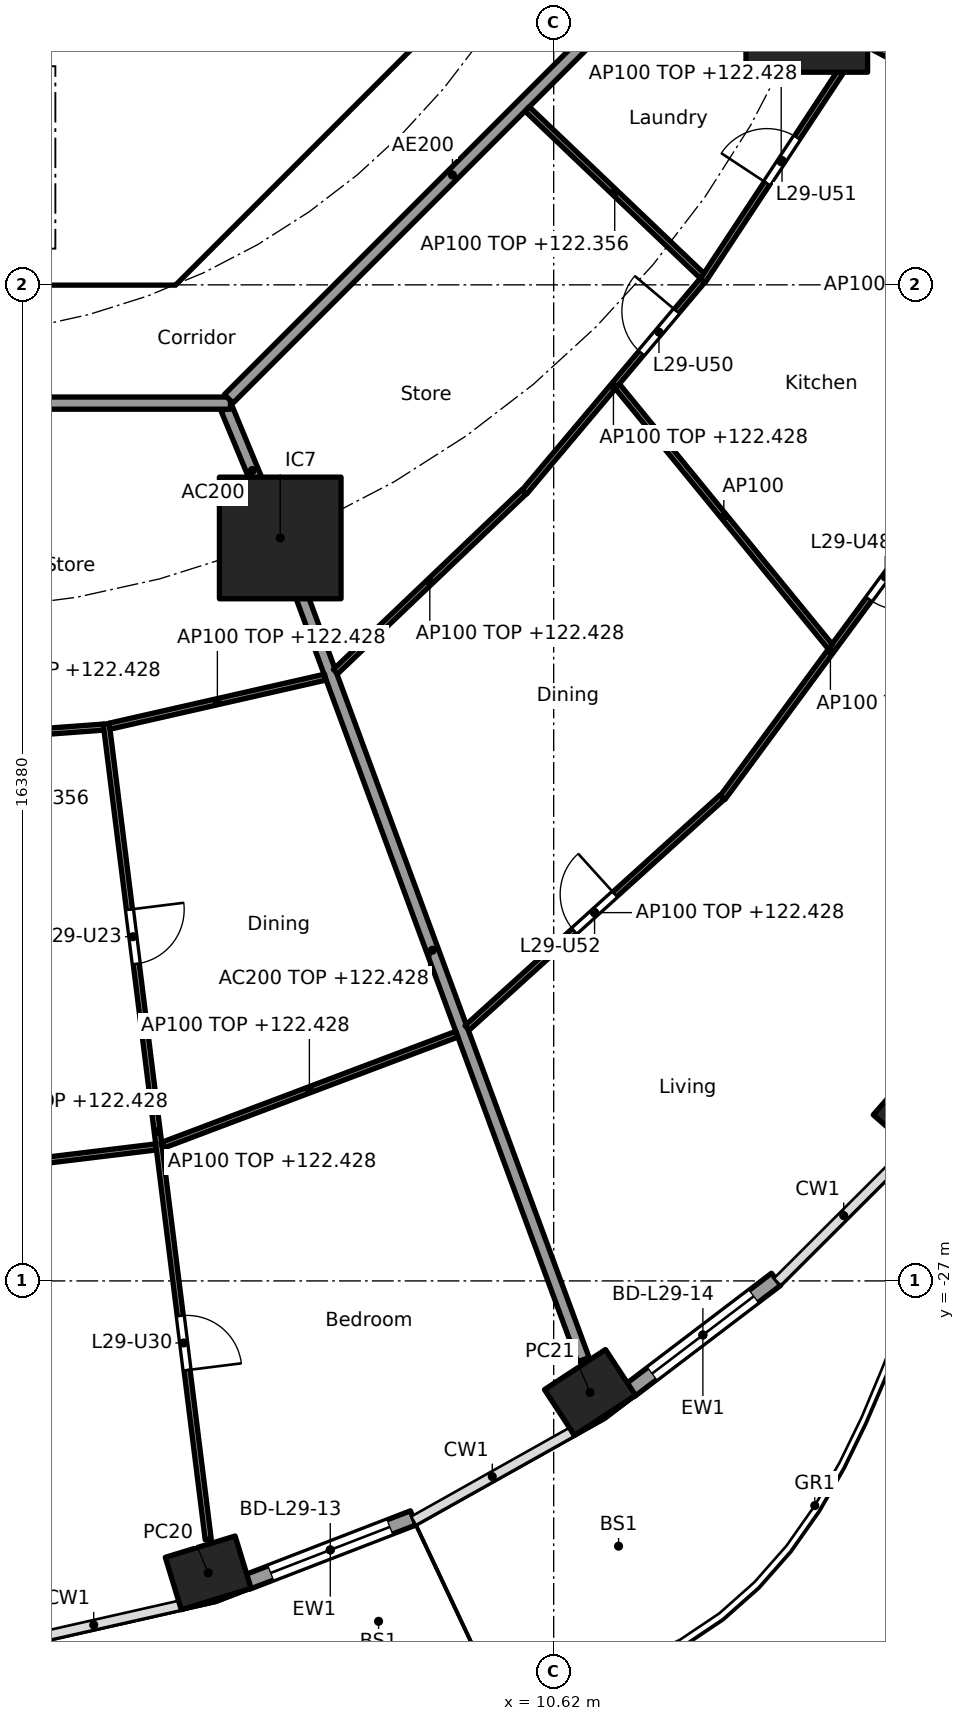
"""IFC4 building model, lengths in metres.
Left out: names, types, materials, properties, quantities, classifications, styles, units other than length and angle.
Written with IfcOpenShell. Run it as: python <this file> out.ifc"""

import sys

from ifc_helpers import new_model, si_unit, direction, frame, frame_2d, origin, origin_2d, place, context, subcontext, project, spatial, polyline, rectangle, hollow_rectangle, outline, extrude, element, fill, save


model = new_model("IFC4")
c1 = context("Model", 3, precision=1e-05, world=origin(), true_north=direction((0.0, 1.0)))
c2 = subcontext(c1, "Body", "Model", "MODEL_VIEW")
j1 = project(units=[si_unit("LENGTHUNIT", "METRE"), si_unit("PLANEANGLEUNIT", "RADIAN")], contexts=[c1])
p1 = place(None, origin())
s1 = spatial("IfcSite", under=j1, at=p1, CompositionType="ELEMENT")
p2 = place(p1, origin())
s2 = spatial("IfcBuilding", under=s1, at=p2, CompositionType="ELEMENT")
p3 = place(p2, frame((0.0, 0.0, 119.6)))
s3 = spatial("IfcBuildingStorey", under=s2, at=p3, CompositionType="ELEMENT", Elevation=119.6)
for number, where, z_axis, x_axis in (
    (1, (4.938, -31.801, -0.26), (0.0, 0.0, 1.0), (0.957, 0.292, 0.0)),
    (2, (11.218, -28.834, -0.26), (0.0, 0.0, 1.0), (0.836, 0.549, 0.0)),
    (3, (16.61, -24.115, -0.26), (0.0, 0.0, 1.0), (0.66, 0.751, 0.0)),
):
    element("IfcColumn", number, at=place(p3, frame(where, z_axis=z_axis, x_axis=x_axis)), inside=s3, PredefinedType="COLUMN", context=c2, shape_type="SweptSolid", body=[
        extrude(hollow_rectangle(XDim=1.2, YDim=0.9, WallThickness=0.04, at=origin_2d()), origin(), (0.0, 0.0, 1.0), 3.96),
    ])
for number, where, z_axis, x_axis in (
    (4, (6.123, -14.782, 0.0), (0.0, 0.0, 1.0), (1.0, 0.0, 0.0)),
    (5, (14.782, -6.123, 0.0), (0.0, 0.0, 1.0), (1.0, 0.0, 0.0)),
):
    element("IfcColumn", number, at=place(p3, frame(where, z_axis=z_axis, x_axis=x_axis)), inside=s3, PredefinedType="COLUMN", context=c2, shape_type="SweptSolid", body=[
        extrude(rectangle(XDim=2.0, YDim=2.0, at=origin_2d()), origin(), (0.0, 0.0, 1.0), 3.7),
    ])
p4 = place(p3, frame((8.31, -30.898, 0.0), z_axis=(0.0, 0.0, 1.0), x_axis=(-0.932845344347, -0.360277064952, 0.0)))
e6 = element("IfcWall", 6, at=p4, inside=s3, PredefinedType="SOLIDWALL", context=c2, shape_type="SweptSolid", body=[
    extrude(rectangle(XDim=2.923, YDim=0.25, at=frame_2d((1.462, 0.0))), origin(), (0.0, 0.0, 1.0), 3.44),
])
p5 = place(p4, frame((0.412, 0.0, 0.0)))
e7 = element("IfcOpeningElement", 7, at=p5, cuts=e6, PredefinedType="OPENING", context=c2, shape_type="SweptSolid", body=[
    extrude(rectangle(XDim=2.1, YDim=2.4, at=frame_2d((1.05, 1.2))), frame((0.0, 0.135, 0.0), z_axis=(0.0, -1.0, 0.0), x_axis=(1.0, 0.0, 0.0)), (0.0, 0.0, 1.0), 0.27),
])
p6 = place(p3, frame((14.278, -26.973, 0.0), z_axis=(0.0, 0.0, 1.0), x_axis=(-0.796022231079, -0.605267385233, 0.0)))
e8 = element("IfcWall", 8, at=p6, inside=s3, PredefinedType="SOLIDWALL", context=c2, shape_type="SweptSolid", body=[
    extrude(rectangle(XDim=3.026, YDim=0.25, at=frame_2d((1.513, 0.0))), origin(), (0.0, 0.0, 1.0), 3.44),
])
p7 = place(p6, frame((0.463, 0.0, 0.0)))
e9 = element("IfcOpeningElement", 9, at=p7, cuts=e8, PredefinedType="OPENING", context=c2, shape_type="SweptSolid", body=[
    extrude(rectangle(XDim=2.1, YDim=2.4, at=frame_2d((1.05, 1.2))), frame((0.0, 0.135, 0.0), z_axis=(0.0, -1.0, 0.0), x_axis=(1.0, 0.0, 0.0)), (0.0, 0.0, 1.0), 0.27),
])
p8 = place(p3, frame((4.613, -9.988, 0.0), z_axis=(0.0, 0.0, 1.0), x_axis=(0.707106781187, 0.707106781187, 0.0)))
e10 = element("IfcWall", 10, at=p8, inside=s3, PredefinedType="SHEAR", context=c2, shape_type="SweptSolid", body=[
    extrude(rectangle(XDim=7.602, YDim=0.6, at=frame_2d((3.801, 0.0))), origin(), (0.0, 0.0, 1.0), 3.44),
])
p9 = place(p8, frame((3.201, 0.0, 0.0)))
e11 = element("IfcOpeningElement", 11, at=p9, cuts=e10, PredefinedType="OPENING", context=c2, shape_type="SweptSolid", body=[
    extrude(rectangle(XDim=1.2, YDim=2.1, at=frame_2d((0.6, 1.05))), frame((0.0, 0.31, 0.0), z_axis=(0.0, -1.0, 0.0), x_axis=(1.0, 0.0, 0.0)), (0.0, 0.0, 1.0), 0.62),
])
p10 = place(p3, frame((4.0, -10.025, 0.0), z_axis=(0.0, 0.0, 1.0), x_axis=(0.0, 1.0, 0.0)))
e12 = element("IfcWall", 12, at=p10, inside=s3, PredefinedType="SOLIDWALL", context=c2, shape_type="SweptSolid", body=[
    extrude(rectangle(XDim=3.0, YDim=0.2, at=frame_2d((1.5, 0.0))), origin(), (0.0, 0.0, 1.0), 3.44),
])
p11 = place(p10, frame((0.975, 0.0, 0.0)))
e13 = element("IfcOpeningElement", 13, at=p11, cuts=e12, PredefinedType="OPENING", context=c2, shape_type="SweptSolid", body=[
    extrude(rectangle(XDim=1.1, YDim=2.1, at=frame_2d((0.55, 1.05))), frame((0.0, 0.11, 0.0), z_axis=(0.0, -1.0, 0.0), x_axis=(1.0, 0.0, 0.0)), (0.0, 0.0, 1.0), 0.22),
])
p12 = place(p3, origin())
e14 = element("IfcWall", 14, at=p12, inside=s3, PredefinedType="SHEAR", context=c2, shape_type="SweptSolid", body=[
    extrude(outline(polyline([(-4.152, -10.025), (4.152, -10.025), (4.401, -9.776), (4.825, -10.2), (4.401, -10.625), (-4.401, -10.625), (-4.825, -10.2), (-4.401, -9.776), (-4.152, -10.025)])), origin(), (0.0, 0.0, 1.0), 3.44),
])
p13 = place(p3, origin())
e15 = element("IfcWall", 15, at=p13, inside=s3, PredefinedType="SOLIDWALL", context=c2, shape_type="SweptSolid", body=[
    extrude(outline(polyline([(4.1, -7.025), (-4.1, -7.025), (-4.1, -6.5), (4.1, -6.5), (4.1, -7.025)])), origin(), (0.0, 0.0, 1.0), 3.44),
])
p14 = place(p3, frame((5.243, -12.657, 0.0), z_axis=(0.0, 0.0, 1.0), x_axis=(0.38273085373, -0.923859888513, 0.0)))
e16 = element("IfcWall", 16, at=p14, inside=s3, PredefinedType="PARTITIONING", context=c2, shape_type="SweptSolid", body=[
    extrude(rectangle(XDim=2.199, YDim=0.2, at=frame_2d((1.1, 0.0))), origin(), (0.0, 0.0, 1.0), 3.44),
])
p15 = place(p3, frame((6.14, -14.829, 0.0), z_axis=(0.0, 0.0, 1.0), x_axis=(0.346169582481, -0.938171956608, 0.0)))
e17 = element("IfcWall", 17, at=p15, inside=s3, PredefinedType="PARTITIONING", context=c2, shape_type="SweptSolid", body=[
    extrude(rectangle(XDim=14.354, YDim=0.2, at=frame_2d((7.177, 0.0))), origin(), (0.0, 0.0, 1.0), 2.828),
])
p16 = place(p3, frame((-5.104, -12.565, 0.0), z_axis=(0.0, 0.0, 1.0), x_axis=(1.0, 0.0, 0.0)))
e18 = element("IfcWall", 18, at=p16, inside=s3, PredefinedType="PARTITIONING", context=c2, shape_type="SweptSolid", body=[
    extrude(rectangle(XDim=10.409, YDim=0.2, at=frame_2d((5.205, 0.0))), origin(), (0.0, 0.0, 1.0), 3.44),
])
p17 = place(p3, frame((5.275, -12.494, 0.0), z_axis=(0.0, 0.0, 1.0), x_axis=(0.707106781187, 0.707106781187, 0.0)))
e19 = element("IfcWall", 19, at=p17, inside=s3, PredefinedType="PARTITIONING", context=c2, shape_type="SweptSolid", body=[
    extrude(rectangle(XDim=10.409, YDim=0.2, at=frame_2d((5.205, 0.0))), origin(), (0.0, 0.0, 1.0), 3.44),
])
p18 = place(p3, frame((-0.436, -18.163, 0.0), z_axis=(0.0, 0.0, 1.0), x_axis=(0.997271025958, 0.073827506966, 0.0)))
e20 = element("IfcWall", 20, at=p18, inside=s3, PredefinedType="PARTITIONING", context=c2, shape_type="SweptSolid", body=[
    extrude(rectangle(XDim=3.664, YDim=0.1, at=frame_2d((1.832, 0.0))), origin(), (0.0, 0.0, 1.0), 2.828),
])
p19 = place(p3, frame((-1.066, -25.422, 0.0), z_axis=(0.0, 0.0, 1.0), x_axis=(0.992692993044, 0.120667400577, 0.0)))
e21 = element("IfcWall", 21, at=p19, inside=s3, PredefinedType="PARTITIONING", context=c2, shape_type="SweptSolid", body=[
    extrude(rectangle(XDim=5.186, YDim=0.1, at=frame_2d((2.593, 0.0))), origin(), (0.0, 0.0, 1.0), 2.828),
])
p20 = place(p3, frame((3.262, -17.839, 0.0), z_axis=(0.0, 0.0, 1.0), x_axis=(0.124074750982, -0.992272873845, 0.0)))
e22 = element("IfcWall", 22, at=p20, inside=s3, PredefinedType="PARTITIONING", context=c2, shape_type="SweptSolid", body=[
    extrude(rectangle(XDim=13.516, YDim=0.1, at=frame_2d((6.758, 0.0))), origin(), (0.0, 0.0, 1.0), 2.828),
])
p21 = place(p20, frame((3.078, 0.0, 0.0)))
e23 = element("IfcOpeningElement", 23, at=p21, cuts=e22, PredefinedType="OPENING", context=c2, shape_type="SweptSolid", body=[
    extrude(rectangle(XDim=0.9, YDim=2.1, at=frame_2d((0.45, 1.05))), frame((0.0, 0.06, 0.0), z_axis=(0.0, -1.0, 0.0), x_axis=(1.0, 0.0, 0.0)), (0.0, 0.0, 1.0), 0.12),
])
p22 = place(p20, frame((9.811, 0.0, 0.0)))
e24 = element("IfcOpeningElement", 24, at=p22, cuts=e22, PredefinedType="OPENING", context=c2, shape_type="SweptSolid", body=[
    extrude(rectangle(XDim=0.9, YDim=2.1, at=frame_2d((0.45, 1.05))), frame((0.0, 0.06, 0.0), z_axis=(0.0, -1.0, 0.0), x_axis=(1.0, 0.0, 0.0)), (0.0, 0.0, 1.0), 0.12),
])
p23 = place(p3, frame((3.317, -17.878, 0.0), z_axis=(0.0, 0.0, 1.0), x_axis=(0.975095905288, 0.221783623135, 0.0)))
e25 = element("IfcWall", 25, at=p23, inside=s3, PredefinedType="PARTITIONING", context=c2, shape_type="SweptSolid", body=[
    extrude(rectangle(XDim=3.636, YDim=0.1, at=frame_2d((1.818, 0.0))), origin(), (0.0, 0.0, 1.0), 2.828),
])
p24 = place(p3, frame((4.178, -24.773, 0.0), z_axis=(0.0, 0.0, 1.0), x_axis=(0.935583811437, 0.353104703702, 0.0)))
e26 = element("IfcWall", 26, at=p24, inside=s3, PredefinedType="PARTITIONING", context=c2, shape_type="SweptSolid", body=[
    extrude(rectangle(XDim=5.184, YDim=0.1, at=frame_2d((2.592, 0.0))), origin(), (0.0, 0.0, 1.0), 2.828),
])
p25 = place(p3, frame((7.032, -16.98, 0.0), z_axis=(0.0, 0.0, 1.0), x_axis=(0.723709759148, 0.690104473622, 0.0)))
e27 = element("IfcWall", 27, at=p25, inside=s3, PredefinedType="PARTITIONING", context=c2, shape_type="SweptSolid", body=[
    extrude(rectangle(XDim=4.286, YDim=0.1, at=frame_2d((2.143, 0.0))), origin(), (0.0, 0.0, 1.0), 2.828),
])
p26 = place(p3, frame((9.195, -22.84, 0.0), z_axis=(0.0, 0.0, 1.0), x_axis=(0.741675855479, 0.670758470241, 0.0)))
e28 = element("IfcWall", 28, at=p26, inside=s3, PredefinedType="PARTITIONING", context=c2, shape_type="SweptSolid", body=[
    extrude(rectangle(XDim=5.656, YDim=0.1, at=frame_2d((2.828, 0.0))), origin(), (0.0, 0.0, 1.0), 2.828),
])
p27 = place(p26, frame((2.378, 0.0, 0.0)))
e29 = element("IfcOpeningElement", 29, at=p27, cuts=e28, PredefinedType="OPENING", context=c2, shape_type="SweptSolid", body=[
    extrude(rectangle(XDim=0.9, YDim=2.1, at=frame_2d((0.45, 1.05))), frame((0.0, 0.06, 0.0), z_axis=(0.0, -1.0, 0.0), x_axis=(1.0, 0.0, 0.0)), (0.0, 0.0, 1.0), 0.12),
])
p28 = place(p3, frame((10.138, -14.026, 0.0), z_axis=(0.0, 0.0, 1.0), x_axis=(0.644051444483, 0.764982180746, 0.0)))
e30 = element("IfcWall", 30, at=p28, inside=s3, PredefinedType="PARTITIONING", context=c2, shape_type="SweptSolid", body=[
    extrude(rectangle(XDim=4.548, YDim=0.1, at=frame_2d((2.274, 0.0))), origin(), (0.0, 0.0, 1.0), 2.828),
])
p29 = place(p28, frame((2.986, 0.0, 0.0)))
e31 = element("IfcOpeningElement", 31, at=p29, cuts=e30, PredefinedType="OPENING", context=c2, shape_type="SweptSolid", body=[
    extrude(rectangle(XDim=0.9, YDim=2.1, at=frame_2d((0.45, 1.05))), frame((0.0, 0.06, 0.0), z_axis=(0.0, -1.0, 0.0), x_axis=(1.0, 0.0, 0.0)), (0.0, 0.0, 1.0), 0.12),
])
p30 = place(p3, frame((13.397, -19.053, 0.0), z_axis=(0.0, 0.0, 1.0), x_axis=(0.593522299069, 0.804817544856, 0.0)))
e32 = element("IfcWall", 32, at=p30, inside=s3, PredefinedType="PARTITIONING", context=c2, shape_type="SweptSolid", body=[
    extrude(rectangle(XDim=5.976, YDim=0.1, at=frame_2d((2.988, 0.0))), origin(), (0.0, 0.0, 1.0), 2.828),
])
p31 = place(p30, frame((4.057, 0.0, 0.0)))
e33 = element("IfcOpeningElement", 33, at=p31, cuts=e32, PredefinedType="OPENING", context=c2, shape_type="SweptSolid", body=[
    extrude(rectangle(XDim=0.9, YDim=2.1, at=frame_2d((0.45, 1.05))), frame((0.0, 0.06, 0.0), z_axis=(0.0, -1.0, 0.0), x_axis=(1.0, 0.0, 0.0)), (0.0, 0.0, 1.0), 0.12),
])
p32 = place(p3, frame((11.667, -12.287, 0.0), z_axis=(0.0, 0.0, 1.0), x_axis=(0.633038312428, -0.774120465431, 0.0)))
e34 = element("IfcWall", 34, at=p32, inside=s3, PredefinedType="PARTITIONING", context=c2, shape_type="SweptSolid", body=[
    extrude(rectangle(XDim=5.532, YDim=0.1, at=frame_2d((2.766, 0.0))), origin(), (0.0, 0.0, 1.0), 3.44),
])
p33 = place(p3, frame((10.184, -7.727, 0.0), z_axis=(0.0, 0.0, 1.0), x_axis=(0.723654892782, -0.690162007179, 0.0)))
e35 = element("IfcWall", 35, at=p33, inside=s3, PredefinedType="PARTITIONING", context=c2, shape_type="SweptSolid", body=[
    extrude(rectangle(XDim=3.98, YDim=0.1, at=frame_2d((1.99, 0.0))), origin(), (0.0, 0.0, 1.0), 2.756),
])
p34 = place(p3, frame((13.072, -10.55, 0.0), z_axis=(0.0, 0.0, 1.0), x_axis=(0.550614843759, 0.834759422727, 0.0)))
e36 = element("IfcWall", 36, at=p34, inside=s3, PredefinedType="PARTITIONING", context=c2, shape_type="SweptSolid", body=[
    extrude(rectangle(XDim=4.683, YDim=0.1, at=frame_2d((2.341, 0.0))), origin(), (0.0, 0.0, 1.0), 2.828),
])
p35 = place(p34, frame((1.917, 0.0, 0.0)))
e37 = element("IfcOpeningElement", 37, at=p35, cuts=e36, PredefinedType="OPENING", context=c2, shape_type="SweptSolid", body=[
    extrude(rectangle(XDim=0.9, YDim=2.1, at=frame_2d((0.45, 1.05))), frame((0.0, 0.06, 0.0), z_axis=(0.0, -1.0, 0.0), x_axis=(1.0, 0.0, 0.0)), (0.0, 0.0, 1.0), 0.12),
])
p36 = place(p3, frame((14.826, -6.146, 0.0), z_axis=(0.0, 0.0, 1.0), x_axis=(0.883012998471, -0.469348532044, 0.0)))
e38 = element("IfcWall", 38, at=p36, inside=s3, PredefinedType="PARTITIONING", context=c2, shape_type="SweptSolid", body=[
    extrude(rectangle(XDim=9.172, YDim=0.1, at=frame_2d((4.586, 0.0))), origin(), (0.0, 0.0, 1.0), 2.828),
])
p37 = place(p36, frame((2.728, 0.0, 0.0)))
e39 = element("IfcOpeningElement", 39, at=p37, cuts=e38, PredefinedType="OPENING", context=c2, shape_type="SweptSolid", body=[
    extrude(rectangle(XDim=0.9, YDim=2.1, at=frame_2d((0.45, 1.05))), frame((0.0, 0.06, 0.0), z_axis=(0.0, -1.0, 0.0), x_axis=(1.0, 0.0, 0.0)), (0.0, 0.0, 1.0), 0.12),
])
p38 = place(p5, origin())
e40 = element("IfcDoor", 40, at=p38, inside=s3, OperationType="SLIDING_TO_LEFT", PredefinedType="DOOR", context=c2, shape_type="SweptSolid", body=[
    extrude(rectangle(XDim=2.1, YDim=2.4, at=frame_2d((1.05, 1.2))), frame((0.0, 0.025, 0.0), z_axis=(0.0, -1.0, 0.0), x_axis=(1.0, 0.0, 0.0)), (0.0, 0.0, 1.0), 0.05),
])
fill(e7, e40)
p39 = place(p7, origin())
e41 = element("IfcDoor", 41, at=p39, inside=s3, OperationType="SLIDING_TO_LEFT", PredefinedType="DOOR", context=c2, shape_type="SweptSolid", body=[
    extrude(rectangle(XDim=2.1, YDim=2.4, at=frame_2d((1.05, 1.2))), frame((0.0, 0.025, 0.0), z_axis=(0.0, -1.0, 0.0), x_axis=(1.0, 0.0, 0.0)), (0.0, 0.0, 1.0), 0.05),
])
fill(e9, e41)
p40 = place(p11, origin())
e42 = element("IfcDoor", 42, at=p40, inside=s3, OperationType="SINGLE_SWING_LEFT", PredefinedType="DOOR", context=c2, shape_type="SweptSolid", body=[
    extrude(rectangle(XDim=1.1, YDim=2.1, at=frame_2d((0.55, 1.05))), frame((0.0, 0.025, 0.0), z_axis=(0.0, -1.0, 0.0), x_axis=(1.0, 0.0, 0.0)), (0.0, 0.0, 1.0), 0.05),
])
fill(e13, e42)
p41 = place(p9, origin())
e43 = element("IfcDoor", 43, at=p41, inside=s3, OperationType="SINGLE_SWING_RIGHT", PredefinedType="DOOR", context=c2, shape_type="SweptSolid", body=[
    extrude(rectangle(XDim=1.2, YDim=2.1, at=frame_2d((0.6, 1.05))), frame((0.0, 0.025, 0.0), z_axis=(0.0, -1.0, 0.0), x_axis=(1.0, 0.0, 0.0)), (0.0, 0.0, 1.0), 0.05),
])
fill(e11, e43)
p42 = place(p21, origin())
e44 = element("IfcDoor", 44, at=p42, inside=s3, OperationType="SINGLE_SWING_LEFT", PredefinedType="DOOR", context=c2, shape_type="SweptSolid", body=[
    extrude(rectangle(XDim=0.9, YDim=2.1, at=frame_2d((0.45, 1.05))), frame((0.0, 0.025, 0.0), z_axis=(0.0, -1.0, 0.0), x_axis=(1.0, 0.0, 0.0)), (0.0, 0.0, 1.0), 0.05),
])
fill(e23, e44)
p43 = place(p22, origin())
e45 = element("IfcDoor", 45, at=p43, inside=s3, OperationType="SINGLE_SWING_RIGHT", PredefinedType="DOOR", context=c2, shape_type="SweptSolid", body=[
    extrude(rectangle(XDim=0.9, YDim=2.1, at=frame_2d((0.45, 1.05))), frame((0.0, 0.025, 0.0), z_axis=(0.0, -1.0, 0.0), x_axis=(1.0, 0.0, 0.0)), (0.0, 0.0, 1.0), 0.05),
])
fill(e24, e45)
p44 = place(p31, frame((0.9, 0.0, 0.0), x_axis=(-1.0, 0.0, 0.0)))
e46 = element("IfcDoor", 46, at=p44, inside=s3, OperationType="SINGLE_SWING_LEFT", PredefinedType="DOOR", context=c2, shape_type="SweptSolid", body=[
    extrude(rectangle(XDim=0.9, YDim=2.1, at=frame_2d((0.45, 1.05))), frame((0.0, 0.025, 0.0), z_axis=(0.0, -1.0, 0.0), x_axis=(1.0, 0.0, 0.0)), (0.0, 0.0, 1.0), 0.05),
])
fill(e33, e46)
p45 = place(p29, origin())
e47 = element("IfcDoor", 47, at=p45, inside=s3, OperationType="SINGLE_SWING_RIGHT", PredefinedType="DOOR", context=c2, shape_type="SweptSolid", body=[
    extrude(rectangle(XDim=0.9, YDim=2.1, at=frame_2d((0.45, 1.05))), frame((0.0, 0.025, 0.0), z_axis=(0.0, -1.0, 0.0), x_axis=(1.0, 0.0, 0.0)), (0.0, 0.0, 1.0), 0.05),
])
fill(e31, e47)
p46 = place(p35, origin())
e48 = element("IfcDoor", 48, at=p46, inside=s3, OperationType="SINGLE_SWING_LEFT", PredefinedType="DOOR", context=c2, shape_type="SweptSolid", body=[
    extrude(rectangle(XDim=0.9, YDim=2.1, at=frame_2d((0.45, 1.05))), frame((0.0, 0.025, 0.0), z_axis=(0.0, -1.0, 0.0), x_axis=(1.0, 0.0, 0.0)), (0.0, 0.0, 1.0), 0.05),
])
fill(e37, e48)
p47 = place(p27, origin())
e49 = element("IfcDoor", 49, at=p47, inside=s3, OperationType="SINGLE_SWING_RIGHT", PredefinedType="DOOR", context=c2, shape_type="SweptSolid", body=[
    extrude(rectangle(XDim=0.9, YDim=2.1, at=frame_2d((0.45, 1.05))), frame((0.0, 0.025, 0.0), z_axis=(0.0, -1.0, 0.0), x_axis=(1.0, 0.0, 0.0)), (0.0, 0.0, 1.0), 0.05),
])
fill(e29, e49)
save(model, sys.argv[1])
